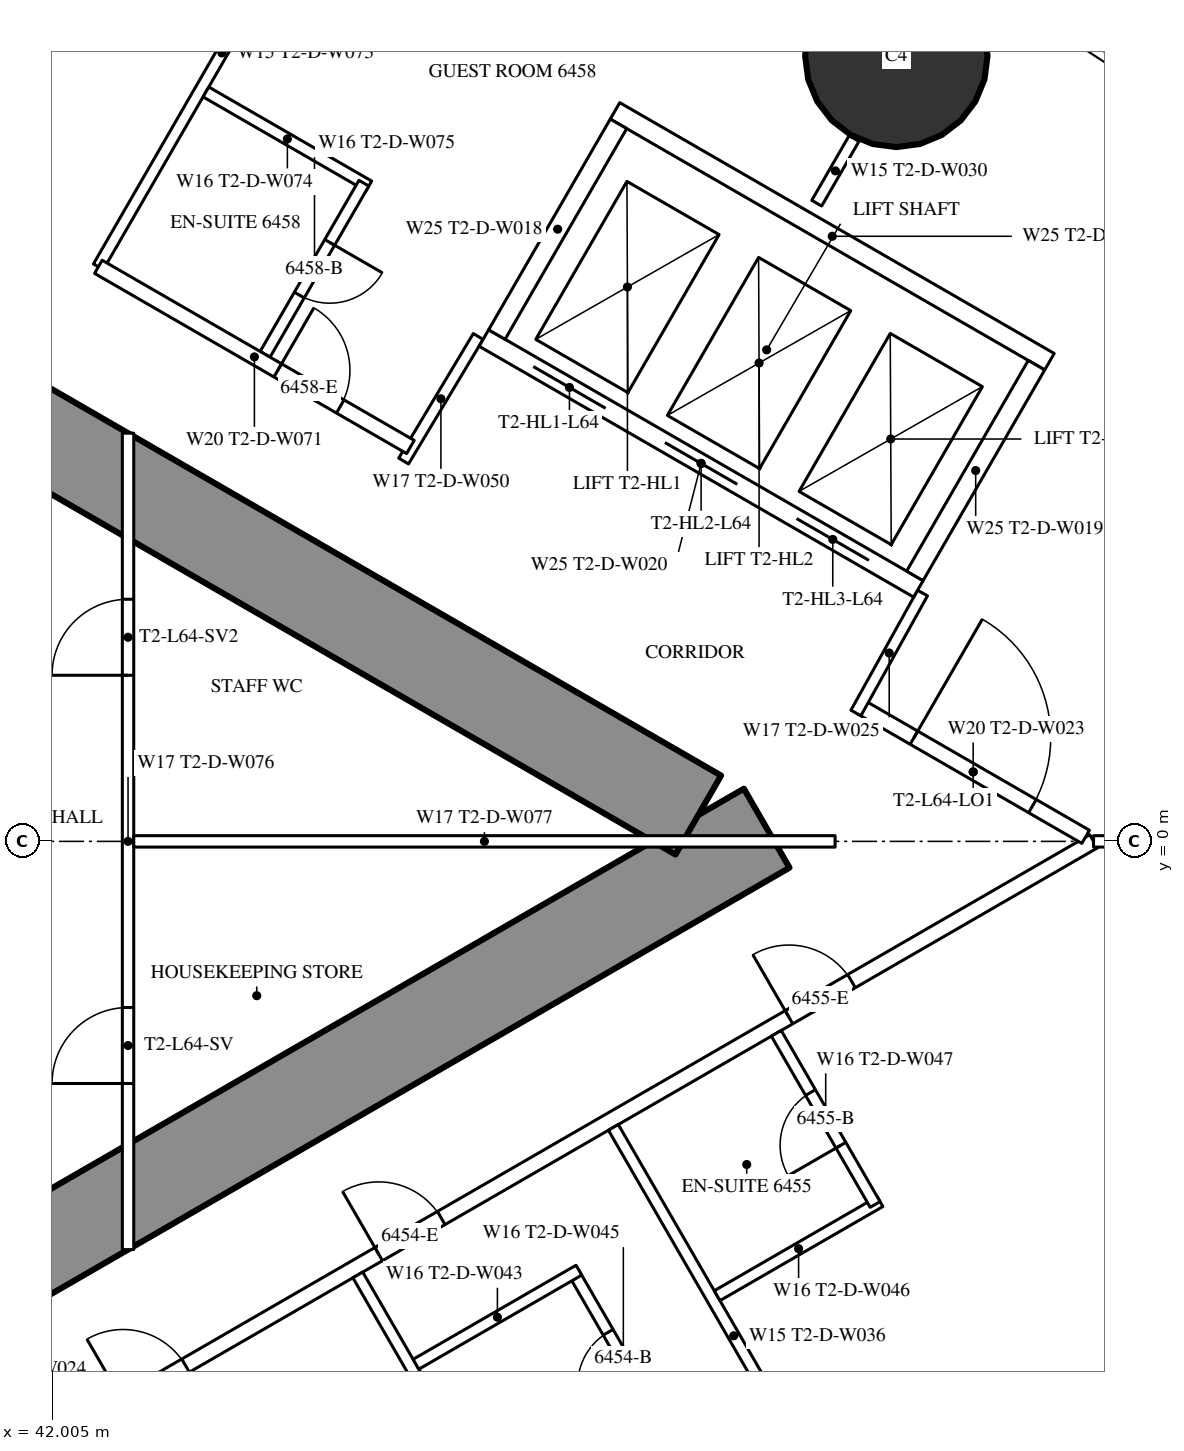
"""IFC4 building model, lengths in metres.
Left out: names, types, materials, properties, quantities, classifications, styles, units other than length and angle.
Written with IfcOpenShell. Run it as: python <this file> out.ifc"""

import sys

from ifc_helpers import new_model, si_unit, direction, frame, frame_2d, origin, origin_2d, place, context, subcontext, project, spatial, rectangle, circle, extrude, element, fill, save


model = new_model("IFC4")
c1 = context("Model", 3, precision=1e-05, world=origin(), true_north=direction((0.0, 1.0)))
c2 = subcontext(c1, "Body", "Model", "MODEL_VIEW")
j1 = project(units=[si_unit("LENGTHUNIT", "METRE"), si_unit("PLANEANGLEUNIT", "RADIAN")], contexts=[c1])
p1 = place(None, origin())
s1 = spatial("IfcSite", under=j1, at=p1, CompositionType="ELEMENT")
p2 = place(p1, origin())
s2 = spatial("IfcBuilding", under=s1, at=p2, CompositionType="ELEMENT")
p3 = place(p2, frame((0.0, 0.0, 240.5)))
s3 = spatial("IfcBuildingStorey", under=s2, at=p3, CompositionType="ELEMENT", Elevation=240.5)
p4 = place(p3, frame((53.108, 10.334, 0.0), z_axis=(0.0, 0.0, 1.0), x_axis=(1.0, 0.0, 0.0)))
e1 = element("IfcColumn", 1, at=p4, inside=s3, PredefinedType="COLUMN", context=c2, shape_type="SweptSolid", body=[
    extrude(circle(Radius=1.2, at=origin_2d()), origin(), (0.0, 0.0, 1.0), 3.6),
])
p5 = place(p3, frame((27.2, -13.8, 0.0), z_axis=(0.0, 0.0, 1.0), x_axis=(0.866027159892, 0.499996958321, 0.0)))
e2 = element("IfcWall", 2, at=p5, inside=s3, PredefinedType="SHEAR", context=c2, shape_type="SweptSolid", body=[
    extrude(rectangle(XDim=27.947, YDim=1.2, at=frame_2d((13.973, 0.0))), origin(), (0.0, 0.0, 1.0), 3.6),
])
p6 = place(p5, frame((4.6, 0.0, 0.0)))
e3 = element("IfcOpeningElement", 3, at=p6, cuts=e2, PredefinedType="OPENING", context=c2, shape_type="SweptSolid", body=[
    extrude(rectangle(XDim=1.0, YDim=2.2, at=frame_2d((0.5, 1.1))), frame((0.0, 0.61, 0.0), z_axis=(0.0, -1.0, 0.0), x_axis=(1.0, 0.0, 0.0)), (0.0, 0.0, 1.0), 1.22),
])
p7 = place(p5, frame((13.395, 0.0, 0.0)))
e4 = element("IfcOpeningElement", 4, at=p7, cuts=e2, PredefinedType="OPENING", context=c2, shape_type="SweptSolid", body=[
    extrude(rectangle(XDim=1.8, YDim=2.2, at=frame_2d((0.9, 1.1))), frame((0.0, 0.61, 0.0), z_axis=(0.0, -1.0, 0.0), x_axis=(1.0, 0.0, 0.0)), (0.0, 0.0, 1.0), 1.22),
])
p8 = place(p3, frame((27.2, 13.8, 0.0), z_axis=(0.0, 0.0, 1.0), x_axis=(0.866024515034, -0.500001539357, 0.0)))
e5 = element("IfcWall", 5, at=p8, inside=s3, PredefinedType="SHEAR", context=c2, shape_type="SweptSolid", body=[
    extrude(rectangle(XDim=26.907, YDim=1.2, at=frame_2d((13.454, 0.0))), origin(), (0.0, 0.0, 1.0), 3.6),
])
p9 = place(p8, frame((4.6, 0.0, 0.0)))
e6 = element("IfcOpeningElement", 6, at=p9, cuts=e5, PredefinedType="OPENING", context=c2, shape_type="SweptSolid", body=[
    extrude(rectangle(XDim=1.0, YDim=2.2, at=frame_2d((0.5, 1.1))), frame((0.0, 0.61, 0.0), z_axis=(0.0, -1.0, 0.0), x_axis=(1.0, 0.0, 0.0)), (0.0, 0.0, 1.0), 1.22),
])
p10 = place(p8, frame((13.395, 0.0, 0.0)))
e7 = element("IfcOpeningElement", 7, at=p10, cuts=e5, PredefinedType="OPENING", context=c2, shape_type="SweptSolid", body=[
    extrude(rectangle(XDim=1.8, YDim=2.2, at=frame_2d((0.9, 1.1))), frame((0.0, 0.61, 0.0), z_axis=(0.0, -1.0, 0.0), x_axis=(1.0, 0.0, 0.0)), (0.0, 0.0, 1.0), 1.22),
])
p11 = place(p3, frame((28.959, -15.44, 0.0), z_axis=(0.0, 0.0, 1.0), x_axis=(0.866025227435, 0.500000305447, 0.0)))
e8 = element("IfcWall", 8, at=p11, inside=s3, PredefinedType="PARTITIONING", context=c2, shape_type="SweptSolid", body=[
    extrude(rectangle(XDim=30.88, YDim=0.2, at=frame_2d((15.44, 0.0))), origin(), (0.0, 0.0, 1.0), 3.35),
])
p12 = place(p11, frame((1.494, 0.0, 0.0)))
e9 = element("IfcOpeningElement", 9, at=p12, cuts=e8, PredefinedType="OPENING", context=c2, shape_type="SweptSolid", body=[
    extrude(rectangle(XDim=1.8, YDim=2.03, at=frame_2d((0.9, 1.015))), frame((0.0, 0.11, 0.0), z_axis=(0.0, -1.0, 0.0), x_axis=(1.0, 0.0, 0.0)), (0.0, 0.0, 1.0), 0.22),
])
p13 = place(p11, frame((7.687, 0.0, 0.0)))
e10 = element("IfcOpeningElement", 10, at=p13, cuts=e8, PredefinedType="OPENING", context=c2, shape_type="SweptSolid", body=[
    extrude(rectangle(XDim=1.0, YDim=2.2, at=frame_2d((0.5, 1.1))), frame((0.0, 0.11, 0.0), z_axis=(0.0, -1.0, 0.0), x_axis=(1.0, 0.0, 0.0)), (0.0, 0.0, 1.0), 0.22),
])
p14 = place(p11, frame((16.137, 0.0, 0.0)))
e11 = element("IfcOpeningElement", 11, at=p14, cuts=e8, PredefinedType="OPENING", context=c2, shape_type="SweptSolid", body=[
    extrude(rectangle(XDim=0.95, YDim=2.2, at=frame_2d((0.475, 1.1))), frame((0.0, 0.11, 0.0), z_axis=(0.0, -1.0, 0.0), x_axis=(1.0, 0.0, 0.0)), (0.0, 0.0, 1.0), 0.22),
])
p15 = place(p11, frame((20.021, 0.0, 0.0)))
e12 = element("IfcOpeningElement", 12, at=p15, cuts=e8, PredefinedType="OPENING", context=c2, shape_type="SweptSolid", body=[
    extrude(rectangle(XDim=0.95, YDim=2.2, at=frame_2d((0.475, 1.1))), frame((0.0, 0.11, 0.0), z_axis=(0.0, -1.0, 0.0), x_axis=(1.0, 0.0, 0.0)), (0.0, 0.0, 1.0), 0.22),
])
p16 = place(p11, frame((26.253, 0.0, 0.0)))
e13 = element("IfcOpeningElement", 13, at=p16, cuts=e8, PredefinedType="OPENING", context=c2, shape_type="SweptSolid", body=[
    extrude(rectangle(XDim=0.95, YDim=2.2, at=frame_2d((0.475, 1.1))), frame((0.0, 0.11, 0.0), z_axis=(0.0, -1.0, 0.0), x_axis=(1.0, 0.0, 0.0)), (0.0, 0.0, 1.0), 0.22),
])
p17 = place(p3, frame((46.023, -5.704, 0.0), z_axis=(0.0, 0.0, 1.0), x_axis=(0.499984478165, -0.866034365135, 0.0)))
e14 = element("IfcWall", 14, at=p17, inside=s3, PredefinedType="PARTITIONING", context=c2, shape_type="SweptSolid", body=[
    extrude(rectangle(XDim=6.426, YDim=0.15, at=frame_2d((3.213, 0.0))), origin(), (0.0, 0.0, 1.0), 2.45),
])
p18 = place(p3, frame((49.385, -3.763, 0.0), z_axis=(0.0, 0.0, 1.0), x_axis=(0.499999447814, -0.866025722589, 0.0)))
e15 = element("IfcWall", 15, at=p18, inside=s3, PredefinedType="PARTITIONING", context=c2, shape_type="SweptSolid", body=[
    extrude(rectangle(XDim=6.333, YDim=0.15, at=frame_2d((3.166, 0.0))), origin(), (0.0, 0.0, 1.0), 2.45),
])
p19 = place(p3, frame((42.61, 7.559, 0.0), z_axis=(0.0, 0.0, 1.0), x_axis=(0.500014058812, 0.866017286774, 0.0)))
e16 = element("IfcWall", 16, at=p19, inside=s3, PredefinedType="PARTITIONING", context=c2, shape_type="SweptSolid", body=[
    extrude(rectangle(XDim=6.498, YDim=0.15, at=frame_2d((3.249, 0.0))), origin(), (0.0, 0.0, 1.0), 2.45),
])
p20 = place(p3, frame((55.702, 0.0, 0.0), z_axis=(0.0, 0.0, 1.0), x_axis=(1.0, 0.0, 0.0)))
e17 = element("IfcWall", 17, at=p20, inside=s3, PredefinedType="PARTITIONING", context=c2, shape_type="SweptSolid", body=[
    extrude(rectangle(XDim=5.619, YDim=0.15, at=frame_2d((2.81, 0.0))), origin(), (0.0, 0.0, 1.0), 2.45),
])
p21 = place(p3, frame((52.06, 8.396, 0.0), z_axis=(0.0, 0.0, 1.0), x_axis=(0.500095379624, 0.865970329329, 0.0)))
e18 = element("IfcWall", 18, at=p21, inside=s3, PredefinedType="PARTITIONING", context=c2, shape_type="SweptSolid", body=[
    extrude(rectangle(XDim=0.982, YDim=0.15, at=frame_2d((0.491, 0.0))), origin(), (0.0, 0.0, 1.0), 3.35),
])
p22 = place(p3, frame((52.639, 1.769, 0.0), z_axis=(0.0, 0.0, 1.0), x_axis=(0.866027340901, -0.4999966448, 0.0)))
e19 = element("IfcWall", 19, at=p22, inside=s3, PredefinedType="PARTITIONING", context=c2, shape_type="SweptSolid", body=[
    extrude(rectangle(XDim=3.417, YDim=0.2, at=frame_2d((1.708, 0.0))), origin(), (0.0, 0.0, 1.0), 3.35),
])
p23 = place(p22, frame((0.809, 0.0, 0.0)))
e20 = element("IfcOpeningElement", 20, at=p23, cuts=e19, PredefinedType="OPENING", context=c2, shape_type="SweptSolid", body=[
    extrude(rectangle(XDim=1.8, YDim=2.2, at=frame_2d((0.9, 1.1))), frame((0.0, 0.11, 0.0), z_axis=(0.0, -1.0, 0.0), x_axis=(1.0, 0.0, 0.0)), (0.0, 0.0, 1.0), 0.22),
])
p24 = place(p3, frame((47.606, 6.642, 0.0), z_axis=(0.0, 0.0, 1.0), x_axis=(-0.51353662755, -0.858067673418, 0.0)))
e21 = element("IfcWall", 21, at=p24, inside=s3, PredefinedType="PARTITIONING", context=c2, shape_type="SweptSolid", body=[
    extrude(rectangle(XDim=1.91, YDim=0.15, at=frame_2d((0.955, 0.0))), origin(), (0.0, 0.0, 1.0), 3.35),
])
p25 = place(p3, frame((52.576, 1.689, 0.0), z_axis=(0.0, 0.0, 1.0), x_axis=(0.485424724123, 0.874278466629, 0.0)))
e22 = element("IfcWall", 22, at=p25, inside=s3, PredefinedType="PARTITIONING", context=c2, shape_type="SweptSolid", body=[
    extrude(rectangle(XDim=1.805, YDim=0.15, at=frame_2d((0.903, 0.0))), origin(), (0.0, 0.0, 1.0), 3.35),
])
p26 = place(p3, frame((48.866, -5.679, 0.0), z_axis=(0.0, 0.0, 1.0), x_axis=(0.500006934395, -0.866021400173, 0.0)))
e23 = element("IfcWall", 23, at=p26, inside=s3, PredefinedType="PARTITIONING", context=c2, shape_type="SweptSolid", body=[
    extrude(rectangle(XDim=2.6, YDim=0.15, at=frame_2d((1.3, 0.0))), origin(), (0.0, 0.0, 1.0), 3.35),
])
p27 = place(p26, frame((0.9, 0.0, 0.0)))
e24 = element("IfcOpeningElement", 24, at=p27, cuts=e23, PredefinedType="OPENING", context=c2, shape_type="SweptSolid", body=[
    extrude(rectangle(XDim=0.8, YDim=2.2, at=frame_2d((0.4, 1.1))), frame((0.0, 0.085, 0.0), z_axis=(0.0, -1.0, 0.0), x_axis=(1.0, 0.0, 0.0)), (0.0, 0.0, 1.0), 0.17),
])
p28 = place(p3, frame((46.788, -6.879, 0.0), z_axis=(0.0, 0.0, 1.0), x_axis=(0.866006523861, 0.500032699561, 0.0)))
e25 = element("IfcWall", 25, at=p28, inside=s3, PredefinedType="PARTITIONING", context=c2, shape_type="SweptSolid", body=[
    extrude(rectangle(XDim=2.475, YDim=0.15, at=frame_2d((1.237, 0.0))), origin(), (0.0, 0.0, 1.0), 3.35),
])
p29 = place(p3, frame((50.75, -5.977, 0.0), z_axis=(0.0, 0.0, 1.0), x_axis=(0.866031185235, 0.4999899861, 0.0)))
e26 = element("IfcWall", 26, at=p29, inside=s3, PredefinedType="PARTITIONING", context=c2, shape_type="SweptSolid", body=[
    extrude(rectangle(XDim=2.475, YDim=0.15, at=frame_2d((1.238, 0.0))), origin(), (0.0, 0.0, 1.0), 3.35),
])
p30 = place(p3, frame((51.529, -2.525, 0.0), z_axis=(0.0, 0.0, 1.0), x_axis=(0.500006934395, -0.866021400173, 0.0)))
e27 = element("IfcWall", 27, at=p30, inside=s3, PredefinedType="PARTITIONING", context=c2, shape_type="SweptSolid", body=[
    extrude(rectangle(XDim=2.6, YDim=0.15, at=frame_2d((1.3, 0.0))), origin(), (0.0, 0.0, 1.0), 3.35),
])
p31 = place(p30, frame((0.9, 0.0, 0.0)))
e28 = element("IfcOpeningElement", 28, at=p31, cuts=e27, PredefinedType="OPENING", context=c2, shape_type="SweptSolid", body=[
    extrude(rectangle(XDim=0.8, YDim=2.2, at=frame_2d((0.4, 1.1))), frame((0.0, 0.085, 0.0), z_axis=(0.0, -1.0, 0.0), x_axis=(1.0, 0.0, 0.0)), (0.0, 0.0, 1.0), 0.17),
])
p32 = place(p3, frame((44.025, 9.86, 0.0), z_axis=(0.0, 0.0, 1.0), x_axis=(0.866006523861, -0.500032699561, 0.0)))
e29 = element("IfcWall", 29, at=p32, inside=s3, PredefinedType="PARTITIONING", context=c2, shape_type="SweptSolid", body=[
    extrude(rectangle(XDim=2.475, YDim=0.15, at=frame_2d((1.237, 0.0))), origin(), (0.0, 0.0, 1.0), 3.35),
])
p33 = place(p3, frame((44.803, 6.408, 0.0), z_axis=(0.0, 0.0, 1.0), x_axis=(0.500047596559, 0.865997922154, 0.0)))
e30 = element("IfcWall", 30, at=p33, inside=s3, PredefinedType="PARTITIONING", context=c2, shape_type="SweptSolid", body=[
    extrude(rectangle(XDim=2.6, YDim=0.15, at=frame_2d((1.3, 0.0))), origin(), (0.0, 0.0, 1.0), 3.35),
])
p34 = place(p33, frame((0.9, 0.0, 0.0)))
e31 = element("IfcOpeningElement", 31, at=p34, cuts=e30, PredefinedType="OPENING", context=c2, shape_type="SweptSolid", body=[
    extrude(rectangle(XDim=0.8, YDim=2.2, at=frame_2d((0.4, 1.1))), frame((0.0, 0.085, 0.0), z_axis=(0.0, -1.0, 0.0), x_axis=(1.0, 0.0, 0.0)), (0.0, 0.0, 1.0), 0.17),
])
p35 = place(p3, frame((42.61, 7.559, 0.0), z_axis=(0.0, 0.0, 1.0), x_axis=(0.866032081755, -0.499988433238, 0.0)))
e32 = element("IfcWall", 32, at=p35, inside=s3, PredefinedType="PARTITIONING", context=c2, shape_type="SweptSolid", body=[
    extrude(rectangle(XDim=4.741, YDim=0.2, at=frame_2d((2.37, 0.0))), origin(), (0.0, 0.0, 1.0), 3.35),
])
p36 = place(p35, frame((2.725, 0.0, 0.0)))
e33 = element("IfcOpeningElement", 33, at=p36, cuts=e32, PredefinedType="OPENING", context=c2, shape_type="SweptSolid", body=[
    extrude(rectangle(XDim=0.95, YDim=2.2, at=frame_2d((0.475, 1.1))), frame((0.0, 0.11, 0.0), z_axis=(0.0, -1.0, 0.0), x_axis=(1.0, 0.0, 0.0)), (0.0, 0.0, 1.0), 0.22),
])
p37 = place(p3, frame((43.0, -5.371, 0.0), z_axis=(0.0, 0.0, 1.0), x_axis=(0.0, 1.0, 0.0)))
e34 = element("IfcWall", 34, at=p37, inside=s3, PredefinedType="PARTITIONING", context=c2, shape_type="SweptSolid", body=[
    extrude(rectangle(XDim=10.741, YDim=0.15, at=frame_2d((5.371, 0.0))), origin(), (0.0, 0.0, 1.0), 3.35),
])
p38 = place(p37, frame((2.185, 0.0, 0.0)))
e35 = element("IfcOpeningElement", 35, at=p38, cuts=e34, PredefinedType="OPENING", context=c2, shape_type="SweptSolid", body=[
    extrude(rectangle(XDim=1.0, YDim=2.2, at=frame_2d((0.5, 1.1))), frame((0.0, 0.085, 0.0), z_axis=(0.0, -1.0, 0.0), x_axis=(1.0, 0.0, 0.0)), (0.0, 0.0, 1.0), 0.17),
])
p39 = place(p37, frame((7.556, 0.0, 0.0)))
e36 = element("IfcOpeningElement", 36, at=p39, cuts=e34, PredefinedType="OPENING", context=c2, shape_type="SweptSolid", body=[
    extrude(rectangle(XDim=1.0, YDim=2.2, at=frame_2d((0.5, 1.1))), frame((0.0, 0.085, 0.0), z_axis=(0.0, -1.0, 0.0), x_axis=(1.0, 0.0, 0.0)), (0.0, 0.0, 1.0), 0.17),
])
p40 = place(p3, frame((43.075, 0.0, 0.0), z_axis=(0.0, 0.0, 1.0), x_axis=(1.0, 0.0, 0.0)))
e37 = element("IfcWall", 37, at=p40, inside=s3, PredefinedType="PARTITIONING", context=c2, shape_type="SweptSolid", body=[
    extrude(rectangle(XDim=9.227, YDim=0.15, at=frame_2d((4.614, 0.0))), origin(), (0.0, 0.0, 1.0), 2.45),
])
p41 = place(p3, frame((47.681, 6.622, 0.0), z_axis=(0.0, 0.0, 1.0), x_axis=(0.86603344179, -0.499986077507, 0.0)))
e38 = element("IfcWall", 38, at=p41, inside=s3, PredefinedType="PARTITIONING", context=c2, shape_type="SweptSolid", body=[
    extrude(rectangle(XDim=6.6, YDim=0.25, at=frame_2d((3.3, 0.0))), origin(), (0.0, 0.0, 1.0), 3.35),
])
p42 = place(p41, frame((0.75, 0.0, 0.0)))
e39 = element("IfcOpeningElement", 39, at=p42, cuts=e38, PredefinedType="OPENING", context=c2, shape_type="SweptSolid", body=[
    extrude(rectangle(XDim=1.1, YDim=2.2, at=frame_2d((0.55, 1.1))), frame((0.0, 0.135, 0.0), z_axis=(0.0, -1.0, 0.0), x_axis=(1.0, 0.0, 0.0)), (0.0, 0.0, 1.0), 0.27),
])
p43 = place(p41, frame((2.75, 0.0, 0.0)))
e40 = element("IfcOpeningElement", 40, at=p43, cuts=e38, PredefinedType="OPENING", context=c2, shape_type="SweptSolid", body=[
    extrude(rectangle(XDim=1.1, YDim=2.2, at=frame_2d((0.55, 1.1))), frame((0.0, 0.135, 0.0), z_axis=(0.0, -1.0, 0.0), x_axis=(1.0, 0.0, 0.0)), (0.0, 0.0, 1.0), 0.27),
])
p44 = place(p41, frame((4.75, 0.0, 0.0)))
e41 = element("IfcOpeningElement", 41, at=p44, cuts=e38, PredefinedType="OPENING", context=c2, shape_type="SweptSolid", body=[
    extrude(rectangle(XDim=1.1, YDim=2.2, at=frame_2d((0.55, 1.1))), frame((0.0, 0.135, 0.0), z_axis=(0.0, -1.0, 0.0), x_axis=(1.0, 0.0, 0.0)), (0.0, 0.0, 1.0), 0.27),
])
p45 = place(p3, frame((49.406, 9.611, 0.0), z_axis=(0.0, 0.0, 1.0), x_axis=(0.86603344179, -0.499986077507, 0.0)))
e42 = element("IfcWall", 42, at=p45, inside=s3, PredefinedType="PARTITIONING", context=c2, shape_type="SweptSolid", body=[
    extrude(rectangle(XDim=6.6, YDim=0.25, at=frame_2d((3.3, 0.0))), origin(), (0.0, 0.0, 1.0), 3.35),
])
p46 = place(p3, frame((47.852, 6.668, 0.0), z_axis=(0.0, 0.0, 1.0), x_axis=(0.499929347863, 0.866066190972, 0.0)))
e43 = element("IfcWall", 43, at=p46, inside=s3, PredefinedType="PARTITIONING", context=c2, shape_type="SweptSolid", body=[
    extrude(rectangle(XDim=3.201, YDim=0.25, at=frame_2d((1.6, 0.0))), origin(), (0.0, 0.0, 1.0), 3.35),
])
p47 = place(p3, frame((53.352, 3.493, 0.0), z_axis=(0.0, 0.0, 1.0), x_axis=(0.499872130319, 0.866099216793, 0.0)))
e44 = element("IfcWall", 44, at=p47, inside=s3, PredefinedType="PARTITIONING", context=c2, shape_type="SweptSolid", body=[
    extrude(rectangle(XDim=3.2, YDim=0.25, at=frame_2d((1.6, 0.0))), origin(), (0.0, 0.0, 1.0), 3.35),
])
p48 = place(p14, origin())
e45 = element("IfcDoor", 45, at=p48, inside=s3, OperationType="SINGLE_SWING_LEFT", PredefinedType="DOOR", context=c2, shape_type="SweptSolid", body=[
    extrude(rectangle(XDim=0.95, YDim=2.2, at=frame_2d((0.475, 1.1))), frame((0.0, 0.025, 0.0), z_axis=(0.0, -1.0, 0.0), x_axis=(1.0, 0.0, 0.0)), (0.0, 0.0, 1.0), 0.05),
])
fill(e11, e45)
p49 = place(p27, origin())
e46 = element("IfcDoor", 46, at=p49, inside=s3, OperationType="SINGLE_SWING_RIGHT", PredefinedType="DOOR", context=c2, shape_type="SweptSolid", body=[
    extrude(rectangle(XDim=0.8, YDim=2.2, at=frame_2d((0.4, 1.1))), frame((0.0, 0.025, 0.0), z_axis=(0.0, -1.0, 0.0), x_axis=(1.0, 0.0, 0.0)), (0.0, 0.0, 1.0), 0.05),
])
fill(e24, e46)
p50 = place(p15, origin())
e47 = element("IfcDoor", 47, at=p50, inside=s3, OperationType="SINGLE_SWING_LEFT", PredefinedType="DOOR", context=c2, shape_type="SweptSolid", body=[
    extrude(rectangle(XDim=0.95, YDim=2.2, at=frame_2d((0.475, 1.1))), frame((0.0, 0.025, 0.0), z_axis=(0.0, -1.0, 0.0), x_axis=(1.0, 0.0, 0.0)), (0.0, 0.0, 1.0), 0.05),
])
fill(e12, e47)
p51 = place(p31, origin())
e48 = element("IfcDoor", 48, at=p51, inside=s3, OperationType="SINGLE_SWING_RIGHT", PredefinedType="DOOR", context=c2, shape_type="SweptSolid", body=[
    extrude(rectangle(XDim=0.8, YDim=2.2, at=frame_2d((0.4, 1.1))), frame((0.0, 0.025, 0.0), z_axis=(0.0, -1.0, 0.0), x_axis=(1.0, 0.0, 0.0)), (0.0, 0.0, 1.0), 0.05),
])
fill(e28, e48)
p52 = place(p16, origin())
e49 = element("IfcDoor", 49, at=p52, inside=s3, OperationType="SINGLE_SWING_LEFT", PredefinedType="DOOR", context=c2, shape_type="SweptSolid", body=[
    extrude(rectangle(XDim=0.95, YDim=2.2, at=frame_2d((0.475, 1.1))), frame((0.0, 0.025, 0.0), z_axis=(0.0, -1.0, 0.0), x_axis=(1.0, 0.0, 0.0)), (0.0, 0.0, 1.0), 0.05),
])
fill(e13, e49)
p53 = place(p34, origin())
e50 = element("IfcDoor", 50, at=p53, inside=s3, OperationType="SINGLE_SWING_RIGHT", PredefinedType="DOOR", context=c2, shape_type="SweptSolid", body=[
    extrude(rectangle(XDim=0.8, YDim=2.2, at=frame_2d((0.4, 1.1))), frame((0.0, 0.025, 0.0), z_axis=(0.0, -1.0, 0.0), x_axis=(1.0, 0.0, 0.0)), (0.0, 0.0, 1.0), 0.05),
])
fill(e31, e50)
p54 = place(p36, origin())
e51 = element("IfcDoor", 51, at=p54, inside=s3, OperationType="SINGLE_SWING_LEFT", PredefinedType="DOOR", context=c2, shape_type="SweptSolid", body=[
    extrude(rectangle(XDim=0.95, YDim=2.2, at=frame_2d((0.475, 1.1))), frame((0.0, 0.025, 0.0), z_axis=(0.0, -1.0, 0.0), x_axis=(1.0, 0.0, 0.0)), (0.0, 0.0, 1.0), 0.05),
])
fill(e33, e51)
p55 = place(p23, origin())
e52 = element("IfcDoor", 52, at=p55, inside=s3, OperationType="DOUBLE_DOOR_SINGLE_SWING", PredefinedType="DOOR", context=c2, shape_type="SweptSolid", body=[
    extrude(rectangle(XDim=1.8, YDim=2.2, at=frame_2d((0.9, 1.1))), frame((0.0, 0.025, 0.0), z_axis=(0.0, -1.0, 0.0), x_axis=(1.0, 0.0, 0.0)), (0.0, 0.0, 1.0), 0.05),
])
fill(e20, e52)
p56 = place(p38, origin())
e53 = element("IfcDoor", 53, at=p56, inside=s3, OperationType="SINGLE_SWING_LEFT", PredefinedType="DOOR", context=c2, shape_type="SweptSolid", body=[
    extrude(rectangle(XDim=1.0, YDim=2.2, at=frame_2d((0.5, 1.1))), frame((0.0, 0.025, 0.0), z_axis=(0.0, -1.0, 0.0), x_axis=(1.0, 0.0, 0.0)), (0.0, 0.0, 1.0), 0.05),
])
fill(e35, e53)
p57 = place(p39, origin())
e54 = element("IfcDoor", 54, at=p57, inside=s3, OperationType="SINGLE_SWING_LEFT", PredefinedType="DOOR", context=c2, shape_type="SweptSolid", body=[
    extrude(rectangle(XDim=1.0, YDim=2.2, at=frame_2d((0.5, 1.1))), frame((0.0, 0.025, 0.0), z_axis=(0.0, -1.0, 0.0), x_axis=(1.0, 0.0, 0.0)), (0.0, 0.0, 1.0), 0.05),
])
fill(e36, e54)
p58 = place(p42, origin())
e55 = element("IfcDoor", 55, at=p58, inside=s3, OperationType="DOUBLE_DOOR_SLIDING", PredefinedType="USERDEFINED", context=c2, shape_type="SweptSolid", body=[
    extrude(rectangle(XDim=1.1, YDim=2.2, at=frame_2d((0.55, 1.1))), frame((0.0, 0.025, 0.0), z_axis=(0.0, -1.0, 0.0), x_axis=(1.0, 0.0, 0.0)), (0.0, 0.0, 1.0), 0.05),
])
fill(e39, e55)
p59 = place(p43, origin())
e56 = element("IfcDoor", 56, at=p59, inside=s3, OperationType="DOUBLE_DOOR_SLIDING", PredefinedType="USERDEFINED", context=c2, shape_type="SweptSolid", body=[
    extrude(rectangle(XDim=1.1, YDim=2.2, at=frame_2d((0.55, 1.1))), frame((0.0, 0.025, 0.0), z_axis=(0.0, -1.0, 0.0), x_axis=(1.0, 0.0, 0.0)), (0.0, 0.0, 1.0), 0.05),
])
fill(e40, e56)
p60 = place(p44, origin())
e57 = element("IfcDoor", 57, at=p60, inside=s3, OperationType="DOUBLE_DOOR_SLIDING", PredefinedType="USERDEFINED", context=c2, shape_type="SweptSolid", body=[
    extrude(rectangle(XDim=1.1, YDim=2.2, at=frame_2d((0.55, 1.1))), frame((0.0, 0.025, 0.0), z_axis=(0.0, -1.0, 0.0), x_axis=(1.0, 0.0, 0.0)), (0.0, 0.0, 1.0), 0.05),
])
fill(e41, e57)
save(model, sys.argv[1])
